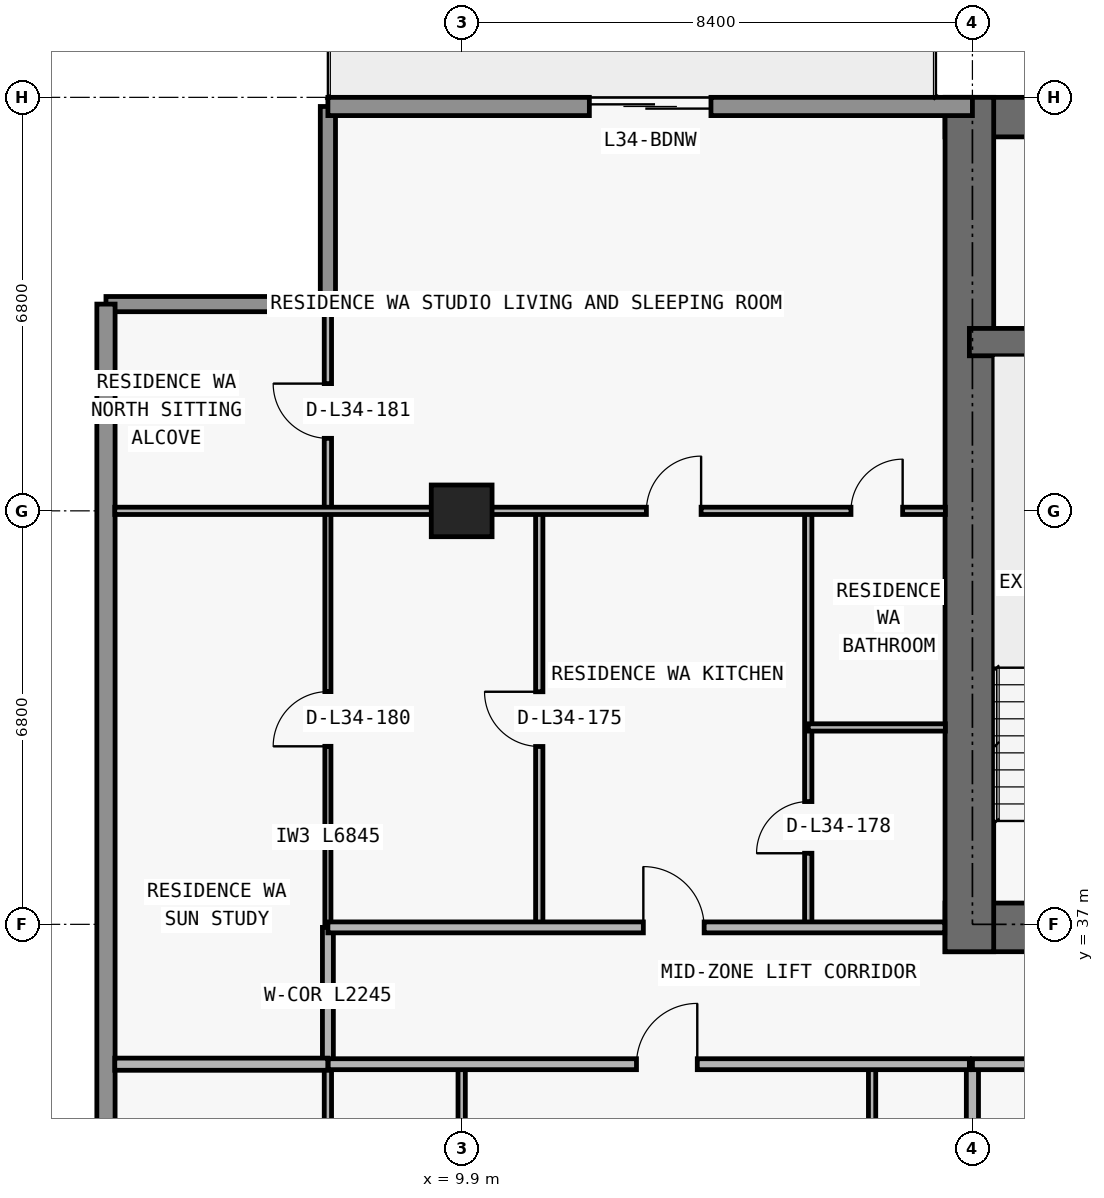
"""IFC4 building model, lengths in metres.
Left out: names, types, materials, properties, quantities, classifications, styles, units other than length and angle.
Written with IfcOpenShell. Run it as: python <this file> out.ifc"""

import sys

from ifc_helpers import new_model, si_unit, direction, frame, frame_2d, origin, origin_2d, place, context, subcontext, project, spatial, rectangle, extrude, element, fill, save


model = new_model("IFC4")
c1 = context("Model", 3, precision=1e-05, world=origin(), true_north=direction((0.0, 1.0)))
c2 = subcontext(c1, "Body", "Model", "MODEL_VIEW")
j1 = project(units=[si_unit("LENGTHUNIT", "METRE"), si_unit("PLANEANGLEUNIT", "RADIAN")], contexts=[c1])
p1 = place(None, origin())
s1 = spatial("IfcSite", under=j1, at=p1, CompositionType="ELEMENT")
p2 = place(p1, origin())
s2 = spatial("IfcBuilding", under=s1, at=p2, CompositionType="ELEMENT")
p3 = place(p2, frame((0.0, 0.0, 125.7)))
s3 = spatial("IfcBuildingStorey", under=s2, at=p3, CompositionType="ELEMENT", Elevation=125.7)
p4 = place(p3, frame((9.9, 43.8, 0.0), z_axis=(0.0, 0.0, 1.0), x_axis=(1.0, 0.0, 0.0)))
e1 = element("IfcColumn", 1, at=p4, inside=s3, PredefinedType="COLUMN", context=c2, shape_type="SweptSolid", body=[
    extrude(rectangle(XDim=1.0, YDim=0.85, at=origin_2d()), origin(), (0.0, 0.0, 1.0), 3.05),
])
p5 = place(p3, frame((17.85, 36.95, 0.0), z_axis=(0.0, 0.0, 1.0), x_axis=(1.0, 0.0, 0.0)))
e2 = element("IfcWall", 2, at=p5, inside=s3, PredefinedType="SHEAR", context=c2, shape_type="SweptSolid", body=[
    extrude(rectangle(XDim=42.1, YDim=0.8, at=frame_2d((21.05, 0.0))), origin(), (0.0, 0.0, 1.0), 3.05),
])
p6 = place(p5, frame((14.45, 0.0, 0.0)))
e3 = element("IfcOpeningElement", 3, at=p6, cuts=e2, PredefinedType="OPENING", context=c2, shape_type="SweptSolid", body=[
    extrude(rectangle(XDim=1.1, YDim=2.15, at=frame_2d((0.55, 1.075))), frame((0.0, 0.41, 0.0), z_axis=(0.0, -1.0, 0.0), x_axis=(1.0, 0.0, 0.0)), (0.0, 0.0, 1.0), 0.82),
])
p7 = place(p5, frame((6.3, 0.0, 0.0)))
e4 = element("IfcOpeningElement", 4, at=p7, cuts=e2, PredefinedType="OPENING", context=c2, shape_type="SweptSolid", body=[
    extrude(rectangle(XDim=1.05, YDim=2.15, at=frame_2d((0.525, 1.075))), frame((0.0, 0.41, 0.0), z_axis=(0.0, -1.0, 0.0), x_axis=(1.0, 0.0, 0.0)), (0.0, 0.0, 1.0), 0.82),
])
p8 = place(p5, frame((34.8, 0.0, 0.0)))
e5 = element("IfcOpeningElement", 5, at=p8, cuts=e2, PredefinedType="OPENING", context=c2, shape_type="SweptSolid", body=[
    extrude(rectangle(XDim=1.05, YDim=2.15, at=frame_2d((0.525, 1.075))), frame((0.0, 0.41, 0.0), z_axis=(0.0, -1.0, 0.0), x_axis=(1.0, 0.0, 0.0)), (0.0, 0.0, 1.0), 0.82),
])
p9 = place(p5, frame((10.913, 0.0, 0.0)))
e6 = element("IfcOpeningElement", 6, at=p9, cuts=e2, PredefinedType="OPENING", context=c2, shape_type="SweptSolid", body=[
    extrude(rectangle(XDim=1.05, YDim=2.15, at=frame_2d((0.525, 1.075))), frame((0.0, 0.41, 0.0), z_axis=(0.0, -1.0, 0.0), x_axis=(1.0, 0.0, 0.0)), (0.0, 0.0, 1.0), 0.82),
])
p10 = place(p5, frame((24.15, 0.0, 0.0)))
e7 = element("IfcOpeningElement", 7, at=p10, cuts=e2, PredefinedType="OPENING", context=c2, shape_type="SweptSolid", body=[
    extrude(rectangle(XDim=1.05, YDim=2.15, at=frame_2d((0.525, 1.075))), frame((0.0, 0.41, 0.0), z_axis=(0.0, -1.0, 0.0), x_axis=(1.0, 0.0, 0.0)), (0.0, 0.0, 1.0), 0.82),
])
p11 = place(p3, frame((17.85, 50.275, 0.0), z_axis=(0.0, 0.0, 1.0), x_axis=(1.0, 0.0, 0.0)))
e8 = element("IfcWall", 8, at=p11, inside=s3, PredefinedType="SHEAR", context=c2, shape_type="SweptSolid", body=[
    extrude(rectangle(XDim=42.1, YDim=0.65, at=frame_2d((21.05, 0.0))), origin(), (0.0, 0.0, 1.0), 3.05),
])
p12 = place(p3, frame((18.25, 36.55, 0.0), z_axis=(0.0, 0.0, 1.0), x_axis=(0.0, 1.0, 0.0)))
e9 = element("IfcWall", 9, at=p12, inside=s3, PredefinedType="SHEAR", context=c2, shape_type="SweptSolid", body=[
    extrude(rectangle(XDim=14.05, YDim=0.8, at=frame_2d((7.025, 0.0))), origin(), (0.0, 0.0, 1.0), 3.05),
])
p13 = place(p3, frame((18.25, 46.575, 0.0), z_axis=(0.0, 0.0, 1.0), x_axis=(1.0, 0.0, 0.0)))
e10 = element("IfcWall", 10, at=p13, inside=s3, PredefinedType="SHEAR", context=c2, shape_type="SweptSolid", body=[
    extrude(rectangle(XDim=41.3, YDim=0.45, at=frame_2d((20.65, 0.0))), origin(), (0.0, 0.0, 1.0), 3.05),
])
p14 = place(p13, frame((7.625, 0.0, 0.0)))
e11 = element("IfcOpeningElement", 11, at=p14, cuts=e10, PredefinedType="OPENING", context=c2, shape_type="SweptSolid", body=[
    extrude(rectangle(XDim=1.05, YDim=2.15, at=frame_2d((0.525, 1.075))), frame((0.0, 0.235, 0.0), z_axis=(0.0, -1.0, 0.0), x_axis=(1.0, 0.0, 0.0)), (0.0, 0.0, 1.0), 0.47),
])
p15 = place(p13, frame((32.675, 0.0, 0.0)))
e12 = element("IfcOpeningElement", 12, at=p15, cuts=e10, PredefinedType="OPENING", context=c2, shape_type="SweptSolid", body=[
    extrude(rectangle(XDim=1.05, YDim=2.15, at=frame_2d((0.525, 1.075))), frame((0.0, 0.235, 0.0), z_axis=(0.0, -1.0, 0.0), x_axis=(1.0, 0.0, 0.0)), (0.0, 0.0, 1.0), 0.47),
])
p16 = place(p3, frame((4.05, 47.2, 0.0), z_axis=(0.0, 0.0, 1.0), x_axis=(1.0, 0.0, 0.0)))
e13 = element("IfcWall", 13, at=p16, inside=s3, PredefinedType="ELEMENTEDWALL", context=c2, shape_type="SweptSolid", body=[
    extrude(rectangle(XDim=3.65, YDim=0.25, at=frame_2d((1.825, 0.0))), origin(), (0.0, 0.0, 1.0), 3.05),
])
p17 = place(p3, frame((7.7, 47.2, 0.0), z_axis=(0.0, 0.0, 1.0), x_axis=(0.0, 1.0, 0.0)))
e14 = element("IfcWall", 14, at=p17, inside=s3, PredefinedType="ELEMENTEDWALL", context=c2, shape_type="SweptSolid", body=[
    extrude(rectangle(XDim=3.25, YDim=0.25, at=frame_2d((1.625, 0.0))), origin(), (0.0, 0.0, 1.0), 3.05),
])
p18 = place(p3, frame((4.05, 28.0, 0.0), z_axis=(0.0, 0.0, 1.0), x_axis=(0.0, 1.0, 0.0)))
e15 = element("IfcWall", 15, at=p18, inside=s3, PredefinedType="STANDARD", context=c2, shape_type="SweptSolid", body=[
    extrude(rectangle(XDim=19.2, YDim=0.3, at=frame_2d((9.6, 0.0))), origin(), (0.0, 0.0, 1.0), 3.05),
])
p19 = place(p3, frame((7.7, 50.45, 0.0), z_axis=(0.0, 0.0, 1.0), x_axis=(1.0, 0.0, 0.0)))
e16 = element("IfcWall", 16, at=p19, inside=s3, PredefinedType="STANDARD", context=c2, shape_type="SweptSolid", body=[
    extrude(rectangle(XDim=10.6, YDim=0.3, at=frame_2d((5.3, 0.0))), origin(), (0.0, 0.0, 1.0), 3.05),
])
p20 = place(p19, frame((4.3, 0.0, 0.0)))
e17 = element("IfcOpeningElement", 17, at=p20, cuts=e16, PredefinedType="OPENING", context=c2, shape_type="SweptSolid", body=[
    extrude(rectangle(XDim=2.0, YDim=2.3, at=frame_2d((1.0, 1.15))), frame((0.0, 0.16, 0.0), z_axis=(0.0, -1.0, 0.0), x_axis=(1.0, 0.0, 0.0)), (0.0, 0.0, 1.0), 0.32),
])
p21 = place(p3, frame((7.7, 26.64, 0.0), z_axis=(0.0, 0.0, 1.0), x_axis=(0.0, 1.0, 0.0)))
e18 = element("IfcWall", 18, at=p21, inside=s3, PredefinedType="PARTITIONING", context=c2, shape_type="SweptSolid", body=[
    extrude(rectangle(XDim=8.06, YDim=0.12, at=frame_2d((4.03, 0.0))), origin(), (0.0, 0.0, 1.0), 3.05),
])
p22 = place(p3, frame((7.7, 34.705, 0.0), z_axis=(0.0, 0.0, 1.0), x_axis=(0.0, 1.0, 0.0)))
e19 = element("IfcWall", 19, at=p22, inside=s3, PredefinedType="PARTITIONING", context=c2, shape_type="SweptSolid", body=[
    extrude(rectangle(XDim=2.245, YDim=0.18, at=frame_2d((1.123, 0.0))), origin(), (0.0, 0.0, 1.0), 3.05),
])
p23 = place(p3, frame((7.7, 36.955, 0.0), z_axis=(0.0, 0.0, 1.0), x_axis=(0.0, 1.0, 0.0)))
e20 = element("IfcWall", 20, at=p23, inside=s3, PredefinedType="MOVABLE", context=c2, shape_type="SweptSolid", body=[
    extrude(rectangle(XDim=6.845, YDim=0.1, at=frame_2d((3.422, 0.0))), origin(), (0.0, 0.0, 1.0), 3.05),
])
p24 = place(p23, frame((2.972, 0.0, 0.0)))
e21 = element("IfcOpeningElement", 21, at=p24, cuts=e20, PredefinedType="OPENING", context=c2, shape_type="SweptSolid", body=[
    extrude(rectangle(XDim=0.9, YDim=2.15, at=frame_2d((0.45, 1.075))), frame((0.0, 0.06, 0.0), z_axis=(0.0, -1.0, 0.0), x_axis=(1.0, 0.0, 0.0)), (0.0, 0.0, 1.0), 0.12),
])
p25 = place(p3, frame((7.7, 43.805, 0.0), z_axis=(0.0, 0.0, 1.0), x_axis=(0.0, 1.0, 0.0)))
e22 = element("IfcWall", 22, at=p25, inside=s3, PredefinedType="PARTITIONING", context=c2, shape_type="SweptSolid", body=[
    extrude(rectangle(XDim=3.275, YDim=0.12, at=frame_2d((1.638, 0.0))), origin(), (0.0, 0.0, 1.0), 3.05),
])
p26 = place(p25, frame((1.188, 0.0, 0.0)))
e23 = element("IfcOpeningElement", 23, at=p26, cuts=e22, PredefinedType="OPENING", context=c2, shape_type="SweptSolid", body=[
    extrude(rectangle(XDim=0.9, YDim=2.15, at=frame_2d((0.45, 1.075))), frame((0.0, 0.07, 0.0), z_axis=(0.0, -1.0, 0.0), x_axis=(1.0, 0.0, 0.0)), (0.0, 0.0, 1.0), 0.14),
])
p27 = place(p3, frame((9.9, 26.64, 0.0), z_axis=(0.0, 0.0, 1.0), x_axis=(0.0, 1.0, 0.0)))
e24 = element("IfcWall", 24, at=p27, inside=s3, PredefinedType="PARTITIONING", context=c2, shape_type="SweptSolid", body=[
    extrude(rectangle(XDim=8.06, YDim=0.12, at=frame_2d((4.03, 0.0))), origin(), (0.0, 0.0, 1.0), 2.174),
])
p28 = place(p3, frame((11.176, 36.95, 0.0), z_axis=(0.0, 0.0, 1.0), x_axis=(0.0, 1.0, 0.0)))
e25 = element("IfcWall", 25, at=p28, inside=s3, PredefinedType="PARTITIONING", context=c2, shape_type="SweptSolid", body=[
    extrude(rectangle(XDim=6.85, YDim=0.12, at=frame_2d((3.425, 0.0))), origin(), (0.0, 0.0, 1.0), 3.05),
])
p29 = place(p28, frame((2.975, 0.0, 0.0)))
e26 = element("IfcOpeningElement", 26, at=p29, cuts=e25, PredefinedType="OPENING", context=c2, shape_type="SweptSolid", body=[
    extrude(rectangle(XDim=0.9, YDim=2.15, at=frame_2d((0.45, 1.075))), frame((0.0, 0.07, 0.0), z_axis=(0.0, -1.0, 0.0), x_axis=(1.0, 0.0, 0.0)), (0.0, 0.0, 1.0), 0.14),
])
p30 = place(p3, frame((15.6, 36.95, 0.0), z_axis=(0.0, 0.0, 1.0), x_axis=(0.0, 1.0, 0.0)))
e27 = element("IfcWall", 27, at=p30, inside=s3, PredefinedType="PARTITIONING", context=c2, shape_type="SweptSolid", body=[
    extrude(rectangle(XDim=6.85, YDim=0.12, at=frame_2d((3.425, 0.0))), origin(), (0.0, 0.0, 1.0), 3.05),
])
p31 = place(p30, frame((1.219, 0.0, 0.0)))
e28 = element("IfcOpeningElement", 28, at=p31, cuts=e27, PredefinedType="OPENING", context=c2, shape_type="SweptSolid", body=[
    extrude(rectangle(XDim=0.85, YDim=2.1, at=frame_2d((0.425, 1.05))), frame((0.0, 0.07, 0.0), z_axis=(0.0, -1.0, 0.0), x_axis=(1.0, 0.0, 0.0)), (0.0, 0.0, 1.0), 0.14),
])
p32 = place(p3, frame((16.65, 26.64, 0.0), z_axis=(0.0, 0.0, 1.0), x_axis=(0.0, 1.0, 0.0)))
e29 = element("IfcWall", 29, at=p32, inside=s3, PredefinedType="PARTITIONING", context=c2, shape_type="SweptSolid", body=[
    extrude(rectangle(XDim=8.06, YDim=0.12, at=frame_2d((4.03, 0.0))), origin(), (0.0, 0.0, 1.0), 3.05),
])
p33 = place(p32, frame((3.755, 0.0, 0.0)))
e30 = element("IfcOpeningElement", 30, at=p33, cuts=e29, PredefinedType="OPENING", context=c2, shape_type="SweptSolid", body=[
    extrude(rectangle(XDim=0.85, YDim=2.1, at=frame_2d((0.425, 1.05))), frame((0.0, 0.07, 0.0), z_axis=(0.0, -1.0, 0.0), x_axis=(1.0, 0.0, 0.0)), (0.0, 0.0, 1.0), 0.14),
])
p34 = place(p3, frame((18.3, 26.64, 0.0), z_axis=(0.0, 0.0, 1.0), x_axis=(0.0, 1.0, 0.0)))
e31 = element("IfcWall", 31, at=p34, inside=s3, PredefinedType="PARTITIONING", context=c2, shape_type="SweptSolid", body=[
    extrude(rectangle(XDim=8.06, YDim=0.2, at=frame_2d((4.03, 0.0))), origin(), (0.0, 0.0, 1.0), 2.174),
])
p35 = place(p3, frame((4.195, 34.7, 0.0), z_axis=(0.0, 0.0, 1.0), x_axis=(1.0, 0.0, 0.0)))
e32 = element("IfcWall", 32, at=p35, inside=s3, PredefinedType="PARTITIONING", context=c2, shape_type="SweptSolid", body=[
    extrude(rectangle(XDim=3.505, YDim=0.2, at=frame_2d((1.752, 0.0))), origin(), (0.0, 0.0, 1.0), 3.05),
])
p36 = place(p3, frame((7.705, 34.7, 0.0), z_axis=(0.0, 0.0, 1.0), x_axis=(1.0, 0.0, 0.0)))
e33 = element("IfcWall", 33, at=p36, inside=s3, PredefinedType="PARTITIONING", context=c2, shape_type="SweptSolid", body=[
    extrude(rectangle(XDim=10.545, YDim=0.18, at=frame_2d((5.272, 0.0))), origin(), (0.0, 0.0, 1.0), 3.05),
])
p37 = place(p36, frame((5.07, 0.0, 0.0)))
e34 = element("IfcOpeningElement", 34, at=p37, cuts=e33, PredefinedType="OPENING", context=c2, shape_type="SweptSolid", body=[
    extrude(rectangle(XDim=1.0, YDim=2.2, at=frame_2d((0.5, 1.1))), frame((0.0, 0.1, 0.0), z_axis=(0.0, -1.0, 0.0), x_axis=(1.0, 0.0, 0.0)), (0.0, 0.0, 1.0), 0.2),
])
p38 = place(p3, frame((18.3, 34.7, 0.0), z_axis=(0.0, 0.0, 1.0), x_axis=(1.0, 0.0, 0.0)))
e35 = element("IfcWall", 35, at=p38, inside=s3, PredefinedType="PARTITIONING", context=c2, shape_type="SweptSolid", body=[
    extrude(rectangle(XDim=8.35, YDim=0.18, at=frame_2d((4.175, 0.0))), origin(), (0.0, 0.0, 1.0), 3.05),
])
p39 = place(p38, frame((2.875, 0.0, 0.0)))
e36 = element("IfcOpeningElement", 36, at=p39, cuts=e35, PredefinedType="OPENING", context=c2, shape_type="SweptSolid", body=[
    extrude(rectangle(XDim=1.0, YDim=2.2, at=frame_2d((0.5, 1.1))), frame((0.0, 0.1, 0.0), z_axis=(0.0, -1.0, 0.0), x_axis=(1.0, 0.0, 0.0)), (0.0, 0.0, 1.0), 0.2),
])
p40 = place(p3, frame((7.7, 36.95, 0.0), z_axis=(0.0, 0.0, 1.0), x_axis=(1.0, 0.0, 0.0)))
e37 = element("IfcWall", 37, at=p40, inside=s3, PredefinedType="PARTITIONING", context=c2, shape_type="SweptSolid", body=[
    extrude(rectangle(XDim=10.145, YDim=0.18, at=frame_2d((5.073, 0.0))), origin(), (0.0, 0.0, 1.0), 3.05),
])
p41 = place(p40, frame((5.188, 0.0, 0.0)))
e38 = element("IfcOpeningElement", 38, at=p41, cuts=e37, PredefinedType="OPENING", context=c2, shape_type="SweptSolid", body=[
    extrude(rectangle(XDim=1.0, YDim=2.2, at=frame_2d((0.5, 1.1))), frame((0.0, 0.1, 0.0), z_axis=(0.0, -1.0, 0.0), x_axis=(1.0, 0.0, 0.0)), (0.0, 0.0, 1.0), 0.2),
])
p42 = place(p3, frame((15.6, 40.238, 0.0), z_axis=(0.0, 0.0, 1.0), x_axis=(1.0, 0.0, 0.0)))
e39 = element("IfcWall", 39, at=p42, inside=s3, PredefinedType="PARTITIONING", context=c2, shape_type="SweptSolid", body=[
    extrude(rectangle(XDim=2.255, YDim=0.12, at=frame_2d((1.127, 0.0))), origin(), (0.0, 0.0, 1.0), 3.05),
])
p43 = place(p3, frame((4.195, 43.8, 0.0), z_axis=(0.0, 0.0, 1.0), x_axis=(1.0, 0.0, 0.0)))
e40 = element("IfcWall", 40, at=p43, inside=s3, PredefinedType="PARTITIONING", context=c2, shape_type="SweptSolid", body=[
    extrude(rectangle(XDim=13.66, YDim=0.12, at=frame_2d((6.83, 0.0))), origin(), (0.0, 0.0, 1.0), 2.339),
])
p44 = place(p43, frame((8.743, 0.0, 0.0)))
e41 = element("IfcOpeningElement", 41, at=p44, cuts=e40, PredefinedType="OPENING", context=c2, shape_type="SweptSolid", body=[
    extrude(rectangle(XDim=0.9, YDim=2.15, at=frame_2d((0.45, 1.075))), frame((0.0, 0.07, 0.0), z_axis=(0.0, -1.0, 0.0), x_axis=(1.0, 0.0, 0.0)), (0.0, 0.0, 1.0), 0.14),
])
p45 = place(p43, frame((12.107, 0.0, 0.0)))
e42 = element("IfcOpeningElement", 42, at=p45, cuts=e40, PredefinedType="OPENING", context=c2, shape_type="SweptSolid", body=[
    extrude(rectangle(XDim=0.85, YDim=2.1, at=frame_2d((0.425, 1.05))), frame((0.0, 0.07, 0.0), z_axis=(0.0, -1.0, 0.0), x_axis=(1.0, 0.0, 0.0)), (0.0, 0.0, 1.0), 0.14),
])
p46 = place(p20, origin())
e43 = element("IfcDoor", 43, at=p46, inside=s3, OperationType="DOUBLE_DOOR_SLIDING", PredefinedType="DOOR", context=c2, shape_type="SweptSolid", body=[
    extrude(rectangle(XDim=2.0, YDim=2.3, at=frame_2d((1.0, 1.15))), frame((0.0, 0.025, 0.0), z_axis=(0.0, -1.0, 0.0), x_axis=(1.0, 0.0, 0.0)), (0.0, 0.0, 1.0), 0.05),
])
fill(e17, e43)
p47 = place(p37, origin())
e44 = element("IfcDoor", 44, at=p47, inside=s3, OperationType="SINGLE_SWING_RIGHT", PredefinedType="DOOR", context=c2, shape_type="SweptSolid", body=[
    extrude(rectangle(XDim=1.0, YDim=2.2, at=frame_2d((0.5, 1.1))), frame((0.0, 0.025, 0.0), z_axis=(0.0, -1.0, 0.0), x_axis=(1.0, 0.0, 0.0)), (0.0, 0.0, 1.0), 0.05),
])
fill(e34, e44)
p48 = place(p29, origin())
e45 = element("IfcDoor", 45, at=p48, inside=s3, OperationType="SINGLE_SWING_RIGHT", PredefinedType="DOOR", context=c2, shape_type="SweptSolid", body=[
    extrude(rectangle(XDim=0.9, YDim=2.15, at=frame_2d((0.45, 1.075))), frame((0.0, 0.025, 0.0), z_axis=(0.0, -1.0, 0.0), x_axis=(1.0, 0.0, 0.0)), (0.0, 0.0, 1.0), 0.05),
])
fill(e26, e45)
p49 = place(p41, origin())
e46 = element("IfcDoor", 46, at=p49, inside=s3, OperationType="SINGLE_SWING_LEFT", PredefinedType="DOOR", context=c2, shape_type="SweptSolid", body=[
    extrude(rectangle(XDim=1.0, YDim=2.2, at=frame_2d((0.5, 1.1))), frame((0.0, 0.025, 0.0), z_axis=(0.0, -1.0, 0.0), x_axis=(1.0, 0.0, 0.0)), (0.0, 0.0, 1.0), 0.05),
])
fill(e38, e46)
p50 = place(p44, origin())
e47 = element("IfcDoor", 47, at=p50, inside=s3, OperationType="SINGLE_SWING_RIGHT", PredefinedType="DOOR", context=c2, shape_type="SweptSolid", body=[
    extrude(rectangle(XDim=0.9, YDim=2.15, at=frame_2d((0.45, 1.075))), frame((0.0, 0.025, 0.0), z_axis=(0.0, -1.0, 0.0), x_axis=(1.0, 0.0, 0.0)), (0.0, 0.0, 1.0), 0.05),
])
fill(e41, e47)
p51 = place(p31, origin())
e48 = element("IfcDoor", 48, at=p51, inside=s3, OperationType="SINGLE_SWING_LEFT", PredefinedType="DOOR", context=c2, shape_type="SweptSolid", body=[
    extrude(rectangle(XDim=0.85, YDim=2.1, at=frame_2d((0.425, 1.05))), frame((0.0, 0.025, 0.0), z_axis=(0.0, -1.0, 0.0), x_axis=(1.0, 0.0, 0.0)), (0.0, 0.0, 1.0), 0.05),
])
fill(e28, e48)
p52 = place(p45, origin())
e49 = element("IfcDoor", 49, at=p52, inside=s3, OperationType="SINGLE_SWING_RIGHT", PredefinedType="DOOR", context=c2, shape_type="SweptSolid", body=[
    extrude(rectangle(XDim=0.85, YDim=2.1, at=frame_2d((0.425, 1.05))), frame((0.0, 0.025, 0.0), z_axis=(0.0, -1.0, 0.0), x_axis=(1.0, 0.0, 0.0)), (0.0, 0.0, 1.0), 0.05),
])
fill(e42, e49)
p53 = place(p24, origin())
e50 = element("IfcDoor", 50, at=p53, inside=s3, OperationType="SINGLE_SWING_LEFT", PredefinedType="DOOR", context=c2, shape_type="SweptSolid", body=[
    extrude(rectangle(XDim=0.9, YDim=2.15, at=frame_2d((0.45, 1.075))), frame((0.0, 0.025, 0.0), z_axis=(0.0, -1.0, 0.0), x_axis=(1.0, 0.0, 0.0)), (0.0, 0.0, 1.0), 0.05),
])
fill(e21, e50)
p54 = place(p26, origin())
e51 = element("IfcDoor", 51, at=p54, inside=s3, OperationType="SINGLE_SWING_RIGHT", PredefinedType="DOOR", context=c2, shape_type="SweptSolid", body=[
    extrude(rectangle(XDim=0.9, YDim=2.15, at=frame_2d((0.45, 1.075))), frame((0.0, 0.025, 0.0), z_axis=(0.0, -1.0, 0.0), x_axis=(1.0, 0.0, 0.0)), (0.0, 0.0, 1.0), 0.05),
])
fill(e23, e51)
save(model, sys.argv[1])
